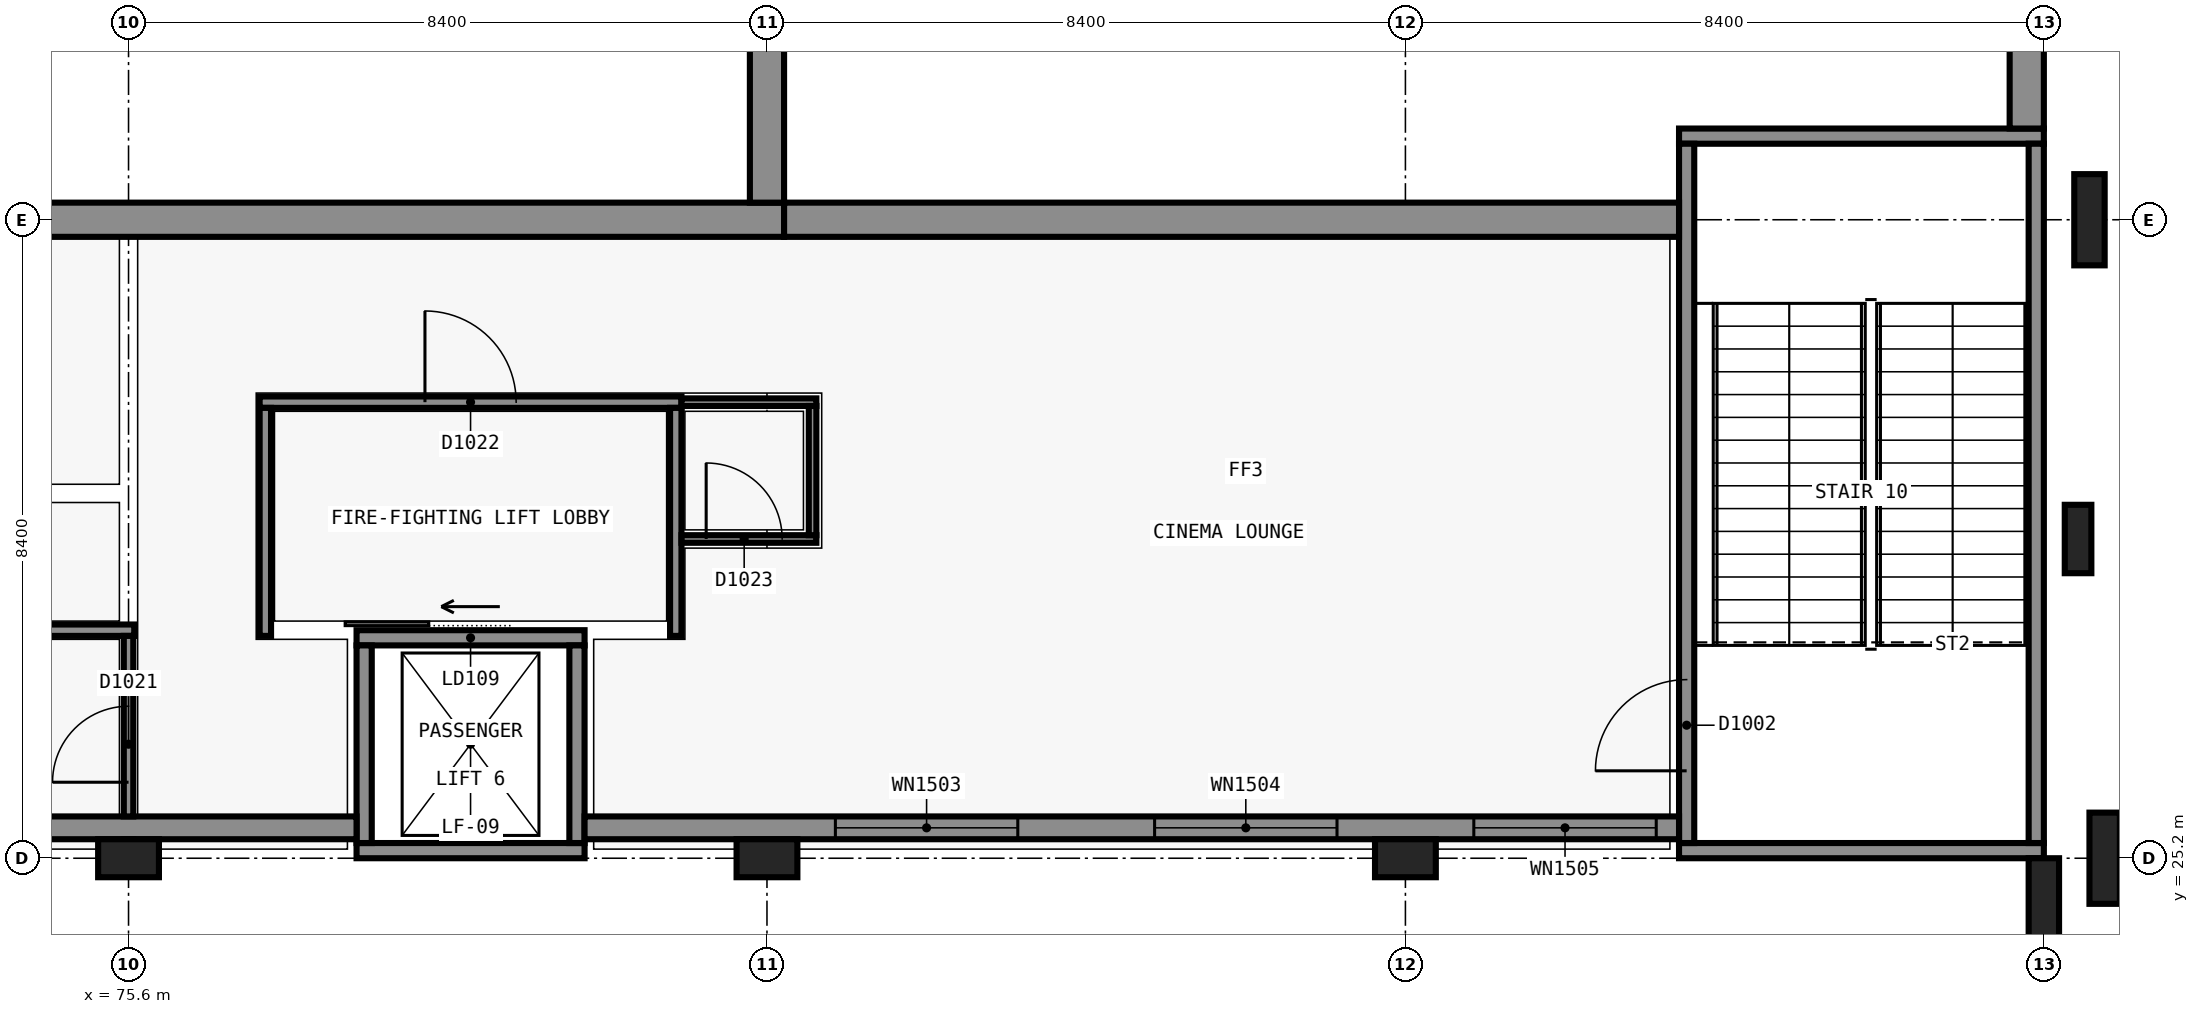
"""IFC4 building model, lengths in metres.
Left out: names, types, materials, properties, quantities, classifications, styles, units other than length and angle.
Written with IfcOpenShell. Run it as: python <this file> out.ifc"""

import sys

from ifc_helpers import new_model, si_unit, direction, frame, frame_2d, origin, origin_2d, place, context, subcontext, project, spatial, rectangle, extrude, element, fill, save


model = new_model("IFC4")
c1 = context("Model", 3, precision=1e-05, world=origin(), true_north=direction((0.0, 1.0)))
c2 = subcontext(c1, "Body", "Model", "MODEL_VIEW")
j1 = project(units=[si_unit("LENGTHUNIT", "METRE"), si_unit("PLANEANGLEUNIT", "RADIAN")], contexts=[c1])
p1 = place(None, origin())
s1 = spatial("IfcSite", under=j1, at=p1, CompositionType="ELEMENT")
p2 = place(p1, origin())
s2 = spatial("IfcBuilding", under=s1, at=p2, CompositionType="ELEMENT")
p3 = place(p2, frame((0.0, 0.0, 5.4)))
s3 = spatial("IfcBuildingStorey", under=s2, at=p3, CompositionType="ELEMENT", Elevation=5.4)
for number, where, z_axis, x_axis in (
    (1, (100.8, 25.3, 0.0), (0.0, 0.0, 1.0), (-1.0, 0.0, 0.0)),
    (2, (96.0, 34.7, 0.0), (0.0, 0.0, 1.0), (1.0, 0.0, 0.0)),
):
    element("IfcWall", number, at=place(p3, frame(where, z_axis=z_axis, x_axis=x_axis)), inside=s3, PredefinedType="SHEAR", context=c2, shape_type="SweptSolid", body=[
        extrude(rectangle(XDim=4.8, YDim=0.2, at=frame_2d((2.4, 0.0))), origin(), (0.0, 0.0, 1.0), 4.8),
    ])
p4 = place(p3, frame((96.1, 25.4, 0.0), z_axis=(0.0, 0.0, 1.0), x_axis=(0.0, 1.0, 0.0)))
e3 = element("IfcWall", 3, at=p4, inside=s3, PredefinedType="SHEAR", context=c2, shape_type="SweptSolid", body=[
    extrude(rectangle(XDim=9.2, YDim=0.2, at=frame_2d((4.6, 0.0))), origin(), (0.0, 0.0, 1.0), 4.8),
])
p5 = place(p4, frame((0.95, 0.0, 0.0)))
e4 = element("IfcOpeningElement", 4, at=p5, cuts=e3, PredefinedType="OPENING", context=c2, shape_type="SweptSolid", body=[
    extrude(rectangle(XDim=1.2, YDim=2.1, at=frame_2d((0.6, 1.05))), frame((0.0, 0.11, 0.0), z_axis=(0.0, -1.0, 0.0), x_axis=(1.0, 0.0, 0.0)), (0.0, 0.0, 1.0), 0.22),
])
p6 = place(p3, frame((100.7, 34.6, 0.0), z_axis=(0.0, 0.0, 1.0), x_axis=(0.0, -1.0, 0.0)))
e5 = element("IfcWall", 5, at=p6, inside=s3, PredefinedType="SHEAR", context=c2, shape_type="SweptSolid", body=[
    extrude(rectangle(XDim=9.2, YDim=0.2, at=frame_2d((4.6, 0.0))), origin(), (0.0, 0.0, 1.0), 4.8),
])
p7 = place(p3, frame((81.6, 25.3, 0.0), z_axis=(0.0, 0.0, 1.0), x_axis=(-1.0, 0.0, 0.0)))
e6 = element("IfcWall", 6, at=p7, inside=s3, PredefinedType="SHEAR", context=c2, shape_type="SweptSolid", body=[
    extrude(rectangle(XDim=3.0, YDim=0.2, at=frame_2d((1.5, 0.0))), origin(), (0.0, 0.0, 1.0), 4.8),
])
p8 = place(p3, frame((78.6, 28.1, 0.0), z_axis=(0.0, 0.0, 1.0), x_axis=(1.0, 0.0, 0.0)))
e7 = element("IfcWall", 7, at=p8, inside=s3, PredefinedType="SHEAR", context=c2, shape_type="SweptSolid", body=[
    extrude(rectangle(XDim=3.0, YDim=0.2, at=frame_2d((1.5, 0.0))), origin(), (0.0, 0.0, 1.0), 4.8),
])
p9 = place(p8, frame((0.95, 0.0, 0.0)))
e8 = element("IfcOpeningElement", 8, at=p9, cuts=e7, PredefinedType="OPENING", context=c2, shape_type="SweptSolid", body=[
    extrude(rectangle(XDim=1.1, YDim=2.1, at=frame_2d((0.55, 1.05))), frame((0.0, 0.11, 0.0), z_axis=(0.0, -1.0, 0.0), x_axis=(1.0, 0.0, 0.0)), (0.0, 0.0, 1.0), 0.22),
])
for number, where, z_axis, x_axis in (
    (9, (78.7, 25.4, 0.0), (0.0, 0.0, 1.0), (0.0, 1.0, 0.0)),
    (10, (81.5, 28.0, 0.0), (0.0, 0.0, 1.0), (0.0, -1.0, 0.0)),
):
    element("IfcWall", number, at=place(p3, frame(where, z_axis=z_axis, x_axis=x_axis)), inside=s3, PredefinedType="SHEAR", context=c2, shape_type="SweptSolid", body=[
        extrude(rectangle(XDim=2.6, YDim=0.2, at=frame_2d((1.3, 0.0))), origin(), (0.0, 0.0, 1.0), 4.8),
    ])
p10 = place(p3, frame((84.225, 33.6, 0.0), z_axis=(0.0, 0.0, 1.0), x_axis=(-1.0, 0.0, 0.0)))
e11 = element("IfcWall", 11, at=p10, inside=s3, PredefinedType="SHEAR", context=c2, shape_type="SweptSolid", body=[
    extrude(rectangle(XDim=17.025, YDim=0.45, at=frame_2d((8.513, 0.0))), origin(), (0.0, 0.0, 1.0), 4.8),
])
p11 = place(p3, frame((84.0, 58.575, 0.0), z_axis=(0.0, 0.0, 1.0), x_axis=(0.0, -1.0, 0.0)))
e12 = element("IfcWall", 12, at=p11, inside=s3, PredefinedType="SHEAR", context=c2, shape_type="SweptSolid", body=[
    extrude(rectangle(XDim=24.75, YDim=0.45, at=frame_2d((12.375, 0.0))), origin(), (0.0, 0.0, 1.0), 4.8),
])
p12 = place(p3, frame((96.0, 33.6, 0.0), z_axis=(0.0, 0.0, 1.0), x_axis=(-1.0, 0.0, 0.0)))
e13 = element("IfcWall", 13, at=p12, inside=s3, PredefinedType="SHEAR", context=c2, shape_type="SweptSolid", body=[
    extrude(rectangle(XDim=11.775, YDim=0.45, at=frame_2d((5.887, 0.0))), origin(), (0.0, 0.0, 1.0), 4.8),
])
p13 = place(p3, frame((100.575, 57.6, 0.0), z_axis=(0.0, 0.0, 1.0), x_axis=(0.0, -1.0, 0.0)))
e14 = element("IfcWall", 14, at=p13, inside=s3, PredefinedType="SHEAR", context=c2, shape_type="SweptSolid", body=[
    extrude(rectangle(XDim=22.8, YDim=0.45, at=frame_2d((11.4, 0.0))), origin(), (0.0, 0.0, 1.0), 4.8),
])
for number, where, z_axis, x_axis in (
    (15, (75.6, 25.2, 0.0), (0.0, 0.0, 1.0), (1.0, 0.0, 0.0)),
    (16, (84.0, 25.2, 0.0), (0.0, 0.0, 1.0), (1.0, 0.0, 0.0)),
    (17, (92.4, 25.2, 0.0), (0.0, 0.0, 1.0), (1.0, 0.0, 0.0)),
):
    element("IfcColumn", number, at=place(p3, frame(where, z_axis=z_axis, x_axis=x_axis)), inside=s3, PredefinedType="COLUMN", context=c2, shape_type="SweptSolid", body=[
        extrude(rectangle(XDim=0.8, YDim=0.5, at=origin_2d()), origin(), (0.0, 0.0, 1.0), 4.8),
    ])
p14 = place(p3, frame((78.6, 25.6, 0.0), z_axis=(0.0, 0.0, 1.0), x_axis=(-1.0, 0.0, 0.0)))
e18 = element("IfcWall", 18, at=p14, inside=s3, PredefinedType="SOLIDWALL", context=c2, shape_type="SweptSolid", body=[
    extrude(rectangle(XDim=11.4, YDim=0.3, at=frame_2d((5.7, 0.0))), origin(), (0.0, 0.0, 1.0), 4.5),
])
p15 = place(p14, frame((8.7, 0.0, 1.5)))
e19 = element("IfcOpeningElement", 19, at=p15, cuts=e18, PredefinedType="OPENING", context=c2, shape_type="SweptSolid", body=[
    extrude(rectangle(XDim=1.2, YDim=0.9, at=frame_2d((0.6, 0.45))), frame((0.0, 0.16, 0.0), z_axis=(0.0, -1.0, 0.0), x_axis=(1.0, 0.0, 0.0)), (0.0, 0.0, 1.0), 0.32),
])
p16 = place(p14, frame((4.5, 0.0, 1.5)))
e20 = element("IfcOpeningElement", 20, at=p16, cuts=e18, PredefinedType="OPENING", context=c2, shape_type="SweptSolid", body=[
    extrude(rectangle(XDim=1.2, YDim=0.9, at=frame_2d((0.6, 0.45))), frame((0.0, 0.16, 0.0), z_axis=(0.0, -1.0, 0.0), x_axis=(1.0, 0.0, 0.0)), (0.0, 0.0, 1.0), 0.32),
])
p17 = place(p3, frame((96.0, 25.6, 0.0), z_axis=(0.0, 0.0, 1.0), x_axis=(-1.0, 0.0, 0.0)))
e21 = element("IfcWall", 21, at=p17, inside=s3, PredefinedType="SOLIDWALL", context=c2, shape_type="SweptSolid", body=[
    extrude(rectangle(XDim=14.4, YDim=0.3, at=frame_2d((7.2, 0.0))), origin(), (0.0, 0.0, 1.0), 4.5),
])
p18 = place(p17, frame((8.7, 0.0, 0.9)))
e22 = element("IfcOpeningElement", 22, at=p18, cuts=e21, PredefinedType="OPENING", context=c2, shape_type="SweptSolid", body=[
    extrude(rectangle(XDim=2.4, YDim=1.8, at=frame_2d((1.2, 0.9))), frame((0.0, 0.16, 0.0), z_axis=(0.0, -1.0, 0.0), x_axis=(1.0, 0.0, 0.0)), (0.0, 0.0, 1.0), 0.32),
])
p19 = place(p17, frame((4.5, 0.0, 0.9)))
e23 = element("IfcOpeningElement", 23, at=p19, cuts=e21, PredefinedType="OPENING", context=c2, shape_type="SweptSolid", body=[
    extrude(rectangle(XDim=2.4, YDim=1.8, at=frame_2d((1.2, 0.9))), frame((0.0, 0.16, 0.0), z_axis=(0.0, -1.0, 0.0), x_axis=(1.0, 0.0, 0.0)), (0.0, 0.0, 1.0), 0.32),
])
p20 = place(p17, frame((0.3, 0.0, 0.9)))
e24 = element("IfcOpeningElement", 24, at=p20, cuts=e21, PredefinedType="OPENING", context=c2, shape_type="SweptSolid", body=[
    extrude(rectangle(XDim=2.4, YDim=1.8, at=frame_2d((1.2, 0.9))), frame((0.0, 0.16, 0.0), z_axis=(0.0, -1.0, 0.0), x_axis=(1.0, 0.0, 0.0)), (0.0, 0.0, 1.0), 0.32),
])
for number, where, z_axis, x_axis in (
    (25, (100.8, 24.6, 0.0), (0.0, 0.0, 1.0), (1.0, 0.0, 0.0)),
    (26, (101.6, 25.2, 0.0), (0.0, 0.0, 1.0), (0.0, 1.0, 0.0)),
):
    element("IfcColumn", number, at=place(p3, frame(where, z_axis=z_axis, x_axis=x_axis)), inside=s3, PredefinedType="PILASTER", context=c2, shape_type="SweptSolid", body=[
        extrude(rectangle(XDim=0.4, YDim=1.2, at=origin_2d()), origin(), (0.0, 0.0, 1.0), 4.8),
    ])
p21 = place(p3, frame((101.25, 29.4, 0.0), z_axis=(0.0, 0.0, 1.0), x_axis=(0.0, 1.0, 0.0)))
e27 = element("IfcColumn", 27, at=p21, inside=s3, PredefinedType="PILASTER", context=c2, shape_type="SweptSolid", body=[
    extrude(rectangle(XDim=0.35, YDim=0.9, at=origin_2d()), origin(), (0.0, 0.0, 1.0), 4.8),
])
p22 = place(p3, frame((101.4, 33.6, 0.0), z_axis=(0.0, 0.0, 1.0), x_axis=(0.0, 1.0, 0.0)))
e28 = element("IfcColumn", 28, at=p22, inside=s3, PredefinedType="PILASTER", context=c2, shape_type="SweptSolid", body=[
    extrude(rectangle(XDim=0.4, YDim=1.2, at=origin_2d()), origin(), (0.0, 0.0, 1.0), 4.8),
])
p23 = place(p3, frame((67.2, 28.2, 0.0), z_axis=(0.0, 0.0, 1.0), x_axis=(1.0, 0.0, 0.0)))
e29 = element("IfcWall", 29, at=p23, inside=s3, PredefinedType="PARTITIONING", context=c2, shape_type="SweptSolid", body=[
    extrude(rectangle(XDim=8.475, YDim=0.15, at=frame_2d((4.237, 0.0))), origin(), (0.0, 0.0, 1.0), 3.8),
])
p24 = place(p23, frame((1.15, 0.0, 0.0)))
e30 = element("IfcOpeningElement", 30, at=p24, cuts=e29, PredefinedType="OPENING", context=c2, shape_type="SweptSolid", body=[
    extrude(rectangle(XDim=1.0, YDim=2.1, at=frame_2d((0.5, 1.05))), frame((0.0, 0.085, 0.0), z_axis=(0.0, -1.0, 0.0), x_axis=(1.0, 0.0, 0.0)), (0.0, 0.0, 1.0), 0.17),
])
p25 = place(p23, frame((3.875, 0.0, 0.0)))
e31 = element("IfcOpeningElement", 31, at=p25, cuts=e29, PredefinedType="OPENING", context=c2, shape_type="SweptSolid", body=[
    extrude(rectangle(XDim=1.0, YDim=2.1, at=frame_2d((0.5, 1.05))), frame((0.0, 0.085, 0.0), z_axis=(0.0, -1.0, 0.0), x_axis=(1.0, 0.0, 0.0)), (0.0, 0.0, 1.0), 0.17),
])
p26 = place(p3, frame((77.325, 31.2, 0.0), z_axis=(0.0, 0.0, 1.0), x_axis=(1.0, 0.0, 0.0)))
e32 = element("IfcWall", 32, at=p26, inside=s3, PredefinedType="SOLIDWALL", context=c2, shape_type="SweptSolid", body=[
    extrude(rectangle(XDim=5.55, YDim=0.15, at=frame_2d((2.775, 0.0))), origin(), (0.0, 0.0, 1.0), 4.5),
])
p27 = place(p26, frame((2.175, 0.0, 0.0)))
e33 = element("IfcOpeningElement", 33, at=p27, cuts=e32, PredefinedType="OPENING", context=c2, shape_type="SweptSolid", body=[
    extrude(rectangle(XDim=1.2, YDim=2.1, at=frame_2d((0.6, 1.05))), frame((0.0, 0.085, 0.0), z_axis=(0.0, -1.0, 0.0), x_axis=(1.0, 0.0, 0.0)), (0.0, 0.0, 1.0), 0.17),
])
for number, where, z_axis, x_axis in (
    (34, (77.4, 28.125, 0.0), (0.0, 0.0, 1.0), (0.0, 1.0, 0.0)),
    (35, (82.8, 28.125, 0.0), (0.0, 0.0, 1.0), (0.0, 1.0, 0.0)),
):
    element("IfcWall", number, at=place(p3, frame(where, z_axis=z_axis, x_axis=x_axis)), inside=s3, PredefinedType="SOLIDWALL", context=c2, shape_type="SweptSolid", body=[
        extrude(rectangle(XDim=3.0, YDim=0.15, at=frame_2d((1.5, 0.0))), origin(), (0.0, 0.0, 1.0), 4.5),
    ])
p28 = place(p3, frame((75.6, 25.137, 0.0), z_axis=(0.0, 0.0, 1.0), x_axis=(0.0, 1.0, 0.0)))
e36 = element("IfcWall", 36, at=p28, inside=s3, PredefinedType="PARTITIONING", context=c2, shape_type="SweptSolid", body=[
    extrude(rectangle(XDim=0.312, YDim=0.125, at=frame_2d((0.156, 0.0))), origin(), (0.0, 0.0, 1.0), 3.8),
])
p29 = place(p3, frame((75.6, 25.75, 0.0), z_axis=(0.0, 0.0, 1.0), x_axis=(0.0, 1.0, 0.0)))
e37 = element("IfcWall", 37, at=p29, inside=s3, PredefinedType="PARTITIONING", context=c2, shape_type="SweptSolid", body=[
    extrude(rectangle(XDim=2.375, YDim=0.125, at=frame_2d((1.188, 0.0))), origin(), (0.0, 0.0, 1.0), 3.8),
])
p30 = place(p29, frame((0.45, 0.0, 0.0)))
e38 = element("IfcOpeningElement", 38, at=p30, cuts=e37, PredefinedType="OPENING", context=c2, shape_type="SweptSolid", body=[
    extrude(rectangle(XDim=1.0, YDim=2.1, at=frame_2d((0.5, 1.05))), frame((0.0, 0.073, 0.0), z_axis=(0.0, -1.0, 0.0), x_axis=(1.0, 0.0, 0.0)), (0.0, 0.0, 1.0), 0.145),
])
p31 = place(p3, frame((82.875, 29.4, 0.0), z_axis=(0.0, 0.0, 1.0), x_axis=(1.0, 0.0, 0.0)))
e39 = element("IfcWall", 39, at=p31, inside=s3, PredefinedType="PARTITIONING", context=c2, shape_type="SweptSolid", body=[
    extrude(rectangle(XDim=1.775, YDim=0.1, at=frame_2d((0.887, 0.0))), origin(), (0.0, 0.0, 1.0), 3.8),
])
p32 = place(p31, frame((0.325, 0.0, 0.0)))
e40 = element("IfcOpeningElement", 40, at=p32, cuts=e39, PredefinedType="OPENING", context=c2, shape_type="SweptSolid", body=[
    extrude(rectangle(XDim=1.0, YDim=2.1, at=frame_2d((0.5, 1.05))), frame((0.0, 0.06, 0.0), z_axis=(0.0, -1.0, 0.0), x_axis=(1.0, 0.0, 0.0)), (0.0, 0.0, 1.0), 0.12),
])
p33 = place(p3, frame((82.875, 31.2, 0.0), z_axis=(0.0, 0.0, 1.0), x_axis=(1.0, 0.0, 0.0)))
e41 = element("IfcWall", 41, at=p33, inside=s3, PredefinedType="PARTITIONING", context=c2, shape_type="SweptSolid", body=[
    extrude(rectangle(XDim=1.775, YDim=0.1, at=frame_2d((0.887, 0.0))), origin(), (0.0, 0.0, 1.0), 3.8),
])
p34 = place(p3, frame((84.6, 29.45, 0.0), z_axis=(0.0, 0.0, 1.0), x_axis=(0.0, 1.0, 0.0)))
e42 = element("IfcWall", 42, at=p34, inside=s3, PredefinedType="PARTITIONING", context=c2, shape_type="SweptSolid", body=[
    extrude(rectangle(XDim=1.7, YDim=0.1, at=frame_2d((0.85, 0.0))), origin(), (0.0, 0.0, 1.0), 4.5),
])
p35 = place(p18, origin())
e43 = element("IfcWindow", 43, at=p35, inside=s3, PartitioningType="SINGLE_PANEL", PredefinedType="WINDOW", context=c2, shape_type="SweptSolid", body=[
    extrude(rectangle(XDim=2.4, YDim=1.8, at=frame_2d((1.2, 0.9))), frame((0.0, 0.03, 0.0), z_axis=(0.0, -1.0, 0.0), x_axis=(1.0, 0.0, 0.0)), (0.0, 0.0, 1.0), 0.06),
])
fill(e22, e43)
p36 = place(p19, origin())
e44 = element("IfcWindow", 44, at=p36, inside=s3, PartitioningType="SINGLE_PANEL", PredefinedType="WINDOW", context=c2, shape_type="SweptSolid", body=[
    extrude(rectangle(XDim=2.4, YDim=1.8, at=frame_2d((1.2, 0.9))), frame((0.0, 0.03, 0.0), z_axis=(0.0, -1.0, 0.0), x_axis=(1.0, 0.0, 0.0)), (0.0, 0.0, 1.0), 0.06),
])
fill(e23, e44)
p37 = place(p20, origin())
e45 = element("IfcWindow", 45, at=p37, inside=s3, PartitioningType="SINGLE_PANEL", PredefinedType="WINDOW", context=c2, shape_type="SweptSolid", body=[
    extrude(rectangle(XDim=2.4, YDim=1.8, at=frame_2d((1.2, 0.9))), frame((0.0, 0.03, 0.0), z_axis=(0.0, -1.0, 0.0), x_axis=(1.0, 0.0, 0.0)), (0.0, 0.0, 1.0), 0.06),
])
fill(e24, e45)
p38 = place(p9, origin())
e46 = element("IfcDoor", 46, at=p38, inside=s3, OperationType="SLIDING_TO_LEFT", PredefinedType="DOOR", context=c2, shape_type="SweptSolid", body=[
    extrude(rectangle(XDim=1.1, YDim=2.1, at=frame_2d((0.55, 1.05))), frame((0.0, 0.025, 0.0), z_axis=(0.0, -1.0, 0.0), x_axis=(1.0, 0.0, 0.0)), (0.0, 0.0, 1.0), 0.05),
])
fill(e8, e46)
p39 = place(p5, origin())
e47 = element("IfcDoor", 47, at=p39, inside=s3, OperationType="SINGLE_SWING_LEFT", PredefinedType="DOOR", context=c2, shape_type="SweptSolid", body=[
    extrude(rectangle(XDim=1.2, YDim=2.1, at=frame_2d((0.6, 1.05))), frame((0.0, 0.025, 0.0), z_axis=(0.0, -1.0, 0.0), x_axis=(1.0, 0.0, 0.0)), (0.0, 0.0, 1.0), 0.05),
])
fill(e4, e47)
p40 = place(p30, origin())
e48 = element("IfcDoor", 48, at=p40, inside=s3, OperationType="SINGLE_SWING_RIGHT", PredefinedType="DOOR", context=c2, shape_type="SweptSolid", body=[
    extrude(rectangle(XDim=1.0, YDim=2.1, at=frame_2d((0.5, 1.05))), frame((0.0, 0.025, 0.0), z_axis=(0.0, -1.0, 0.0), x_axis=(1.0, 0.0, 0.0)), (0.0, 0.0, 1.0), 0.05),
])
fill(e38, e48)
p41 = place(p27, origin())
e49 = element("IfcDoor", 49, at=p41, inside=s3, OperationType="SINGLE_SWING_LEFT", PredefinedType="DOOR", context=c2, shape_type="SweptSolid", body=[
    extrude(rectangle(XDim=1.2, YDim=2.1, at=frame_2d((0.6, 1.05))), frame((0.0, 0.025, 0.0), z_axis=(0.0, -1.0, 0.0), x_axis=(1.0, 0.0, 0.0)), (0.0, 0.0, 1.0), 0.05),
])
fill(e33, e49)
p42 = place(p32, origin())
e50 = element("IfcDoor", 50, at=p42, inside=s3, OperationType="SINGLE_SWING_LEFT", PredefinedType="DOOR", context=c2, shape_type="SweptSolid", body=[
    extrude(rectangle(XDim=1.0, YDim=2.1, at=frame_2d((0.5, 1.05))), frame((0.0, 0.025, 0.0), z_axis=(0.0, -1.0, 0.0), x_axis=(1.0, 0.0, 0.0)), (0.0, 0.0, 1.0), 0.05),
])
fill(e40, e50)
save(model, sys.argv[1])
